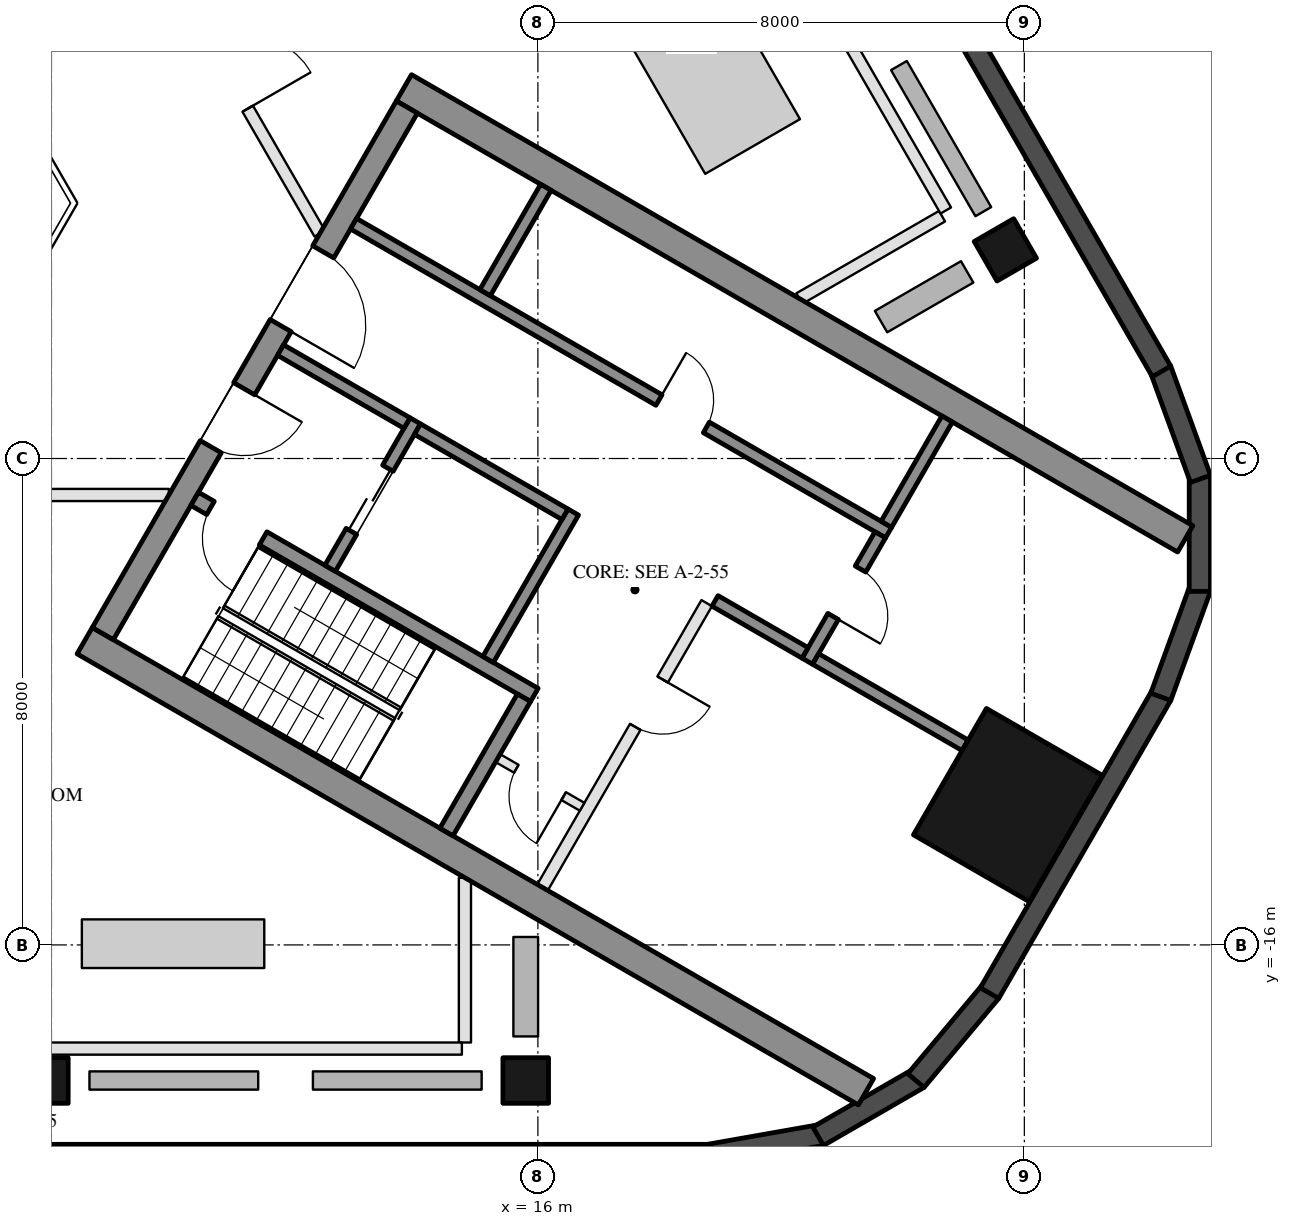
"""IFC4 building model, lengths in metres.
Left out: names, types, materials, properties, quantities, classifications, styles, units other than length and angle.
Written with IfcOpenShell. Run it as: python <this file> out.ifc"""

import sys

from ifc_helpers import new_model, si_unit, direction, frame, frame_2d, origin, origin_2d, place, context, subcontext, project, spatial, rectangle, hollow_rectangle, extrude, element, fill, save


model = new_model("IFC4")
c1 = context("Model", 3, precision=1e-05, world=origin(), true_north=direction((0.0, 1.0)))
c2 = subcontext(c1, "Body", "Model", "MODEL_VIEW")
j1 = project(units=[si_unit("LENGTHUNIT", "METRE"), si_unit("PLANEANGLEUNIT", "RADIAN")], contexts=[c1])
p1 = place(None, origin())
s1 = spatial("IfcSite", under=j1, at=p1, CompositionType="ELEMENT")
p2 = place(p1, origin())
s2 = spatial("IfcBuilding", under=s1, at=p2, CompositionType="ELEMENT")
p3 = place(p2, frame((0.0, 0.0, 237.7)))
s3 = spatial("IfcBuildingStorey", under=s2, at=p3, CompositionType="ELEMENT", Elevation=237.7)
for number, where, z_axis, x_axis in (
    (1, (7.9, -18.23, 0.0), (0.0, 0.0, 1.0), (-1.0, 0.0, 0.0)),
    (2, (15.8, -18.23, 0.0), (0.0, 0.0, 1.0), (-1.0, 0.0, 0.0)),
    (3, (23.688, -4.568, 0.0), (0.0, 0.0, 1.0), (-0.5, 0.866, 0.0)),
):
    element("IfcColumn", number, at=place(p3, frame(where, z_axis=z_axis, x_axis=x_axis)), inside=s3, PredefinedType="COLUMN", context=c2, shape_type="SweptSolid", body=[
        extrude(hollow_rectangle(XDim=0.75, YDim=0.75, WallThickness=0.035, at=origin_2d()), origin(), (0.0, 0.0, 1.0), 4.5),
    ])
p4 = place(p3, frame((23.729, -13.7, 0.0), z_axis=(0.0, 0.0, 1.0), x_axis=(0.5, 0.866025403784, 0.0)))
e4 = element("IfcColumn", 4, at=p4, inside=s3, PredefinedType="COLUMN", context=c2, shape_type="SweptSolid", body=[
    extrude(hollow_rectangle(XDim=2.4, YDim=2.2, WallThickness=0.06, at=origin_2d()), origin(), (0.0, 0.0, 1.0), 4.5),
])
p5 = place(p3, frame((-18.816, -19.455, 0.0), z_axis=(0.0, 0.0, 1.0), x_axis=(1.0, 0.0, 0.0)))
e5 = element("IfcWall", 5, at=p5, inside=s3, PredefinedType="SOLIDWALL", context=c2, shape_type="SweptSolid", body=[
    extrude(rectangle(XDim=37.632, YDim=0.35, at=frame_2d((18.816, 0.0))), origin(), (0.0, 0.0, 1.0), 4.2),
])
p6 = place(p3, frame((18.785, -19.458, 0.0), z_axis=(0.0, 0.0, 1.0), x_axis=(0.984798995425, 0.173697837091, 0.0)))
e6 = element("IfcWall", 6, at=p6, inside=s3, PredefinedType="SOLIDWALL", context=c2, shape_type="SweptSolid", body=[
    extrude(rectangle(XDim=1.91, YDim=0.35, at=frame_2d((0.955, 0.0))), origin(), (0.0, 0.0, 1.0), 4.2),
])
for number, where, z_axis, x_axis in (
    (7, (20.61, -19.147, 0.0), (0.0, 0.0, 1.0), (0.866, 0.5, 0.0)),
    (8, (22.217, -18.231, 0.0), (0.0, 0.0, 1.0), (0.643, 0.766, 0.0)),
):
    element("IfcWall", number, at=place(p3, frame(where, z_axis=z_axis, x_axis=x_axis)), inside=s3, PredefinedType="SOLIDWALL", context=c2, shape_type="SweptSolid", body=[
        extrude(rectangle(XDim=1.91, YDim=0.35, at=frame_2d((0.955, 0.0))), origin(), (0.0, 0.0, 1.0), 4.2),
    ])
p7 = place(p3, frame((23.427, -16.792, 0.0), z_axis=(0.0, 0.0, 1.0), x_axis=(0.499986410639, 0.866033249463, 0.0)))
e9 = element("IfcWall", 9, at=p7, inside=s3, PredefinedType="SOLIDWALL", context=c2, shape_type="SweptSolid", body=[
    extrude(rectangle(XDim=5.658, YDim=0.35, at=frame_2d((2.829, 0.0))), origin(), (0.0, 0.0, 1.0), 4.2),
])
for number, where, z_axis, x_axis in (
    (10, (26.244, -11.92, 0.0), (0.0, 0.0, 1.0), (0.342, 0.94, 0.0)),
    (11, (26.886, -10.185, 0.0), (0.0, 0.0, 1.0), (0.0, 1.0, 0.0)),
    (12, (26.897, -8.335, 0.0), (0.0, 0.0, 1.0), (-0.342, 0.94, 0.0)),
):
    element("IfcWall", number, at=place(p3, frame(where, z_axis=z_axis, x_axis=x_axis)), inside=s3, PredefinedType="SOLIDWALL", context=c2, shape_type="SweptSolid", body=[
        extrude(rectangle(XDim=1.91, YDim=0.35, at=frame_2d((0.955, 0.0))), origin(), (0.0, 0.0, 1.0), 4.2),
    ])
p8 = place(p3, frame((26.256, -6.567, 0.0), z_axis=(0.0, 0.0, 1.0), x_axis=(-0.499998380999, 0.866026338513, 0.0)))
e13 = element("IfcWall", 13, at=p8, inside=s3, PredefinedType="SOLIDWALL", context=c2, shape_type="SweptSolid", body=[
    extrude(rectangle(XDim=37.631, YDim=0.35, at=frame_2d((18.816, 0.0))), origin(), (0.0, 0.0, 1.0), 4.2),
])
for number, where, z_axis, x_axis in (
    (14, (8.547, -10.997, 0.0), (0.0, 0.0, 1.0), (0.866, -0.5, 0.0)),
    (15, (13.797, -1.903, 0.0), (0.0, 0.0, 1.0), (0.866, -0.5, 0.0)),
):
    element("IfcWall", number, at=place(p3, frame(where, z_axis=z_axis, x_axis=x_axis)), inside=s3, PredefinedType="SHEAR", context=c2, shape_type="SweptSolid", body=[
        extrude(rectangle(XDim=14.837, YDim=0.5, at=frame_2d((7.418, 0.0))), origin(), (0.0, 0.0, 1.0), 4.2),
    ])
p9 = place(p3, frame((8.845, -10.88, 0.0), z_axis=(0.0, 0.0, 1.0), x_axis=(0.500004234368, 0.866022959057, 0.0)))
e16 = element("IfcWall", 16, at=p9, inside=s3, PredefinedType="SHEAR", context=c2, shape_type="SweptSolid", body=[
    extrude(rectangle(XDim=10.0, YDim=0.4, at=frame_2d((5.0, 0.0))), origin(), (0.0, 0.0, 1.0), 4.2),
])
p10 = place(p9, frame((3.55, 0.0, 0.0)))
e17 = element("IfcOpeningElement", 17, at=p10, cuts=e16, PredefinedType="OPENING", context=c2, shape_type="SweptSolid", body=[
    extrude(rectangle(XDim=1.1, YDim=2.1, at=frame_2d((0.55, 1.05))), frame((0.0, 0.21, 0.0), z_axis=(0.0, -1.0, 0.0), x_axis=(1.0, 0.0, 0.0)), (0.0, 0.0, 1.0), 0.42),
])
p11 = place(p9, frame((5.85, 0.0, 0.0)))
e18 = element("IfcOpeningElement", 18, at=p11, cuts=e16, PredefinedType="OPENING", context=c2, shape_type="SweptSolid", body=[
    extrude(rectangle(XDim=1.4, YDim=2.1, at=frame_2d((0.7, 1.05))), frame((0.0, 0.21, 0.0), z_axis=(0.0, -1.0, 0.0), x_axis=(1.0, 0.0, 0.0)), (0.0, 0.0, 1.0), 0.42),
])
p12 = place(p3, frame((10.356, -8.664, 0.0), z_axis=(0.0, 0.0, 1.0), x_axis=(0.866028629588, -0.499994412703, 0.0)))
e19 = element("IfcWall", 19, at=p12, inside=s3, PredefinedType="SHEAR", context=c2, shape_type="SweptSolid", body=[
    extrude(rectangle(XDim=6.45, YDim=0.25, at=frame_2d((3.225, 0.0))), origin(), (0.0, 0.0, 1.0), 4.2),
])
p13 = place(p12, frame((0.3, 0.0, 0.0)))
e20 = element("IfcOpeningElement", 20, at=p13, cuts=e19, PredefinedType="OPENING", context=c2, shape_type="SweptSolid", body=[
    extrude(rectangle(XDim=1.0, YDim=2.1, at=frame_2d((0.5, 1.05))), frame((0.0, 0.135, 0.0), z_axis=(0.0, -1.0, 0.0), x_axis=(1.0, 0.0, 0.0)), (0.0, 0.0, 1.0), 0.27),
])
p14 = place(p3, frame((14.496, -14.143, 0.0), z_axis=(0.0, 0.0, 1.0), x_axis=(0.500062241894, 0.865989465428, 0.0)))
e21 = element("IfcWall", 21, at=p14, inside=s3, PredefinedType="SHEAR", context=c2, shape_type="SweptSolid", body=[
    extrude(rectangle(XDim=2.55, YDim=0.25, at=frame_2d((1.275, 0.0))), origin(), (0.0, 0.0, 1.0), 4.2),
])
p15 = place(p3, frame((15.181, -11.305, 0.0), z_axis=(0.0, 0.0, 1.0), x_axis=(0.49994636267, 0.866056369097, 0.0)))
e22 = element("IfcWall", 22, at=p15, inside=s3, PredefinedType="SHEAR", context=c2, shape_type="SweptSolid", body=[
    extrude(rectangle(XDim=2.8, YDim=0.2, at=frame_2d((1.4, 0.0))), origin(), (0.0, 0.0, 1.0), 4.2),
])
p16 = place(p3, frame((12.583, -9.805, 0.0), z_axis=(0.0, 0.0, 1.0), x_axis=(0.49994636267, 0.866056369097, 0.0)))
e23 = element("IfcWall", 23, at=p16, inside=s3, PredefinedType="SHEAR", context=c2, shape_type="SweptSolid", body=[
    extrude(rectangle(XDim=2.8, YDim=0.2, at=frame_2d((1.4, 0.0))), origin(), (0.0, 0.0, 1.0), 4.2),
])
p17 = place(p16, frame((0.7, 0.0, 0.0)))
e24 = element("IfcOpeningElement", 24, at=p17, cuts=e23, PredefinedType="OPENING", context=c2, shape_type="SweptSolid", body=[
    extrude(rectangle(XDim=1.2, YDim=2.1, at=frame_2d((0.6, 1.05))), frame((0.0, 0.11, 0.0), z_axis=(0.0, -1.0, 0.0), x_axis=(1.0, 0.0, 0.0)), (0.0, 0.0, 1.0), 0.22),
])
p18 = place(p3, frame((11.768, -6.217, 0.0), z_axis=(0.0, 0.0, 1.0), x_axis=(0.866050077142, -0.499957262057, 0.0)))
e25 = element("IfcWall", 25, at=p18, inside=s3, PredefinedType="SHEAR", context=c2, shape_type="SweptSolid", body=[
    extrude(rectangle(XDim=2.4, YDim=0.2, at=frame_2d((1.2, 0.0))), origin(), (0.0, 0.0, 1.0), 4.2),
])
p19 = place(p3, frame((14.02, -7.517, 0.0), z_axis=(0.0, 0.0, 1.0), x_axis=(0.866034573852, -0.49998411664, 0.0)))
e26 = element("IfcWall", 26, at=p19, inside=s3, PredefinedType="SHEAR", context=c2, shape_type="SweptSolid", body=[
    extrude(rectangle(XDim=2.8, YDim=0.2, at=frame_2d((1.4, 0.0))), origin(), (0.0, 0.0, 1.0), 4.2),
])
p20 = place(p3, frame((12.968, -4.138, 0.0), z_axis=(0.0, 0.0, 1.0), x_axis=(0.866028328073, -0.49999493495, 0.0)))
e27 = element("IfcWall", 27, at=p20, inside=s3, PredefinedType="SHEAR", context=c2, shape_type="SweptSolid", body=[
    extrude(rectangle(XDim=10.16, YDim=0.2, at=frame_2d((5.08, 0.0))), origin(), (0.0, 0.0, 1.0), 4.2),
])
p21 = place(p20, frame((5.8, 0.0, 0.0)))
e28 = element("IfcOpeningElement", 28, at=p21, cuts=e27, PredefinedType="OPENING", context=c2, shape_type="SweptSolid", body=[
    extrude(rectangle(XDim=0.9, YDim=2.1, at=frame_2d((0.45, 1.05))), frame((0.0, 0.11, 0.0), z_axis=(0.0, -1.0, 0.0), x_axis=(1.0, 0.0, 0.0)), (0.0, 0.0, 1.0), 0.22),
])
p22 = place(p3, frame((20.43, -11.333, 0.0), z_axis=(0.0, 0.0, 1.0), x_axis=(0.500001309137, 0.866024647952, 0.0)))
e29 = element("IfcWall", 29, at=p22, inside=s3, PredefinedType="SHEAR", context=c2, shape_type="SweptSolid", body=[
    extrude(rectangle(XDim=2.4, YDim=0.2, at=frame_2d((1.2, 0.0))), origin(), (0.0, 0.0, 1.0), 4.2),
])
p23 = place(p22, frame((0.85, 0.0, 0.0)))
e30 = element("IfcOpeningElement", 30, at=p23, cuts=e29, PredefinedType="OPENING", context=c2, shape_type="SweptSolid", body=[
    extrude(rectangle(XDim=0.9, YDim=2.1, at=frame_2d((0.45, 1.05))), frame((0.0, 0.11, 0.0), z_axis=(0.0, -1.0, 0.0), x_axis=(1.0, 0.0, 0.0)), (0.0, 0.0, 1.0), 0.22),
])
p24 = place(p3, frame((18.913, -10.342, 0.0), z_axis=(0.0, 0.0, 1.0), x_axis=(0.866038183914, -0.499977863513, 0.0)))
e31 = element("IfcWall", 31, at=p24, inside=s3, PredefinedType="SHEAR", context=c2, shape_type="SweptSolid", body=[
    extrude(rectangle(XDim=1.71, YDim=0.2, at=frame_2d((0.855, 0.0))), origin(), (0.0, 0.0, 1.0), 4.2),
])
for number, where, z_axis, x_axis in (
    (32, (15.131, -5.272, 0.0), (0.0, 0.0, 1.0), (0.5, 0.866, 0.0)),
    (33, (21.73, -9.082, 0.0), (0.0, 0.0, 1.0), (0.5, 0.866, 0.0)),
):
    element("IfcWall", number, at=place(p3, frame(where, z_axis=z_axis, x_axis=x_axis)), inside=s3, PredefinedType="SHEAR", context=c2, shape_type="SweptSolid", body=[
        extrude(rectangle(XDim=2.0, YDim=0.2, at=frame_2d((1.0, 0.0))), origin(), (0.0, 0.0, 1.0), 4.2),
    ])
p25 = place(p3, frame((20.567, -11.297, 0.0), z_axis=(0.0, 0.0, 1.0), x_axis=(0.866055327414, -0.49994816717, 0.0)))
e34 = element("IfcWall", 34, at=p25, inside=s3, PredefinedType="SHEAR", context=c2, shape_type="SweptSolid", body=[
    extrude(rectangle(XDim=2.84, YDim=0.2, at=frame_2d((1.42, 0.0))), origin(), (0.0, 0.0, 1.0), 4.2),
])
p26 = place(p3, frame((16.076, -15.055, 0.0), z_axis=(0.0, 0.0, 1.0), x_axis=(0.499995103361, 0.866028230842, 0.0)))
e35 = element("IfcWall", 35, at=p26, inside=s3, PredefinedType="PARTITIONING", context=c2, shape_type="SweptSolid", body=[
    extrude(rectangle(XDim=5.4, YDim=0.2, at=frame_2d((2.7, 0.0))), origin(), (0.0, 0.0, 1.0), 4.2),
])
p27 = place(p26, frame((3.05, 0.0, 0.0)))
e36 = element("IfcOpeningElement", 36, at=p27, cuts=e35, PredefinedType="OPENING", context=c2, shape_type="SweptSolid", body=[
    extrude(rectangle(XDim=0.9, YDim=2.1, at=frame_2d((0.45, 1.05))), frame((0.0, 0.11, 0.0), z_axis=(0.0, -1.0, 0.0), x_axis=(1.0, 0.0, 0.0)), (0.0, 0.0, 1.0), 0.22),
])
p28 = place(p3, frame((15.342, -12.928, 0.0), z_axis=(0.0, 0.0, 1.0), x_axis=(0.865989903783, -0.500061482766, 0.0)))
e37 = element("IfcWall", 37, at=p28, inside=s3, PredefinedType="PARTITIONING", context=c2, shape_type="SweptSolid", body=[
    extrude(rectangle(XDim=1.6, YDim=0.15, at=frame_2d((0.8, 0.0))), origin(), (0.0, 0.0, 1.0), 4.2),
])
p29 = place(p28, frame((0.35, 0.0, 0.0)))
e38 = element("IfcOpeningElement", 38, at=p29, cuts=e37, PredefinedType="OPENING", context=c2, shape_type="SweptSolid", body=[
    extrude(rectangle(XDim=0.9, YDim=2.1, at=frame_2d((0.45, 1.05))), frame((0.0, 0.085, 0.0), z_axis=(0.0, -1.0, 0.0), x_axis=(1.0, 0.0, 0.0)), (0.0, 0.0, 1.0), 0.17),
])
p30 = place(p3, frame((14.8, -17.605, 0.0), z_axis=(0.0, 0.0, 1.0), x_axis=(0.0, 1.0, 0.0)))
e39 = element("IfcWall", 39, at=p30, inside=s3, PredefinedType="PARTITIONING", context=c2, shape_type="SweptSolid", body=[
    extrude(rectangle(XDim=2.709, YDim=0.2, at=frame_2d((1.355, 0.0))), origin(), (0.0, 0.0, 1.0), 4.2),
])
p31 = place(p3, frame((-14.75, -17.705, 0.0), z_axis=(0.0, 0.0, 1.0), x_axis=(1.0, 0.0, 0.0)))
e40 = element("IfcWall", 40, at=p31, inside=s3, PredefinedType="PARTITIONING", context=c2, shape_type="SweptSolid", body=[
    extrude(rectangle(XDim=29.5, YDim=0.2, at=frame_2d((14.75, 0.0))), origin(), (0.0, 0.0, 1.0), 3.41),
])
p32 = place(p3, frame((-9.93, -8.6, 0.0), z_axis=(0.0, 0.0, 1.0), x_axis=(1.0, 0.0, 0.0)))
e41 = element("IfcWall", 41, at=p32, inside=s3, PredefinedType="PARTITIONING", context=c2, shape_type="SweptSolid", body=[
    extrude(rectangle(XDim=19.861, YDim=0.2, at=frame_2d((9.93, 0.0))), origin(), (0.0, 0.0, 1.0), 3.41),
])
p33 = place(p32, frame((6.121, 0.0, 0.0)))
e42 = element("IfcOpeningElement", 42, at=p33, cuts=e41, PredefinedType="OPENING", context=c2, shape_type="SweptSolid", body=[
    extrude(rectangle(XDim=1.2, YDim=2.1, at=frame_2d((0.6, 1.05))), frame((0.0, 0.11, 0.0), z_axis=(0.0, -1.0, 0.0), x_axis=(1.0, 0.0, 0.0)), (0.0, 0.0, 1.0), 0.22),
])
p34 = place(p32, frame((16.04, 0.0, 0.0)))
e43 = element("IfcOpeningElement", 43, at=p34, cuts=e41, PredefinedType="OPENING", context=c2, shape_type="SweptSolid", body=[
    extrude(rectangle(XDim=1.2, YDim=2.1, at=frame_2d((0.6, 1.05))), frame((0.0, 0.11, 0.0), z_axis=(0.0, -1.0, 0.0), x_axis=(1.0, 0.0, 0.0)), (0.0, 0.0, 1.0), 0.22),
])
p35 = place(p3, frame((22.646, -4.015, 0.0), z_axis=(0.0, 0.0, 1.0), x_axis=(-0.866044551023, -0.499966834543, 0.0)))
e44 = element("IfcWall", 44, at=p35, inside=s3, PredefinedType="PARTITIONING", context=c2, shape_type="SweptSolid", body=[
    extrude(rectangle(XDim=2.71, YDim=0.2, at=frame_2d((1.355, 0.0))), origin(), (0.0, 0.0, 1.0), 4.2),
])
p36 = place(p3, frame((22.708, -3.921, 0.0), z_axis=(0.0, 0.0, 1.0), x_axis=(-0.499998500593, 0.866026269466, 0.0)))
e45 = element("IfcWall", 45, at=p36, inside=s3, PredefinedType="PARTITIONING", context=c2, shape_type="SweptSolid", body=[
    extrude(rectangle(XDim=29.5, YDim=0.2, at=frame_2d((14.75, 0.0))), origin(), (0.0, 0.0, 1.0), 3.41),
])
p37 = place(p3, frame((12.413, -4.3, 0.0), z_axis=(0.0, 0.0, 1.0), x_axis=(-0.50000478328, 0.866022642139, 0.0)))
e46 = element("IfcWall", 46, at=p37, inside=s3, PredefinedType="PARTITIONING", context=c2, shape_type="SweptSolid", body=[
    extrude(rectangle(XDim=19.861, YDim=0.2, at=frame_2d((9.931, 0.0))), origin(), (0.0, 0.0, 1.0), 3.41),
])
p38 = place(p37, frame((2.371, 0.0, 0.0)))
e47 = element("IfcOpeningElement", 47, at=p38, cuts=e46, PredefinedType="OPENING", context=c2, shape_type="SweptSolid", body=[
    extrude(rectangle(XDim=1.2, YDim=2.1, at=frame_2d((0.6, 1.05))), frame((0.0, 0.11, 0.0), z_axis=(0.0, -1.0, 0.0), x_axis=(1.0, 0.0, 0.0)), (0.0, 0.0, 1.0), 0.22),
])
p39 = place(p37, frame((8.581, 0.0, 0.0)))
e48 = element("IfcOpeningElement", 48, at=p39, cuts=e46, PredefinedType="OPENING", context=c2, shape_type="SweptSolid", body=[
    extrude(rectangle(XDim=1.2, YDim=2.1, at=frame_2d((0.6, 1.05))), frame((0.0, 0.11, 0.0), z_axis=(0.0, -1.0, 0.0), x_axis=(1.0, 0.0, 0.0)), (0.0, 0.0, 1.0), 0.22),
])
p40 = place(p37, frame((15.54, 0.0, 0.0)))
e49 = element("IfcOpeningElement", 49, at=p40, cuts=e46, PredefinedType="OPENING", context=c2, shape_type="SweptSolid", body=[
    extrude(rectangle(XDim=1.2, YDim=2.1, at=frame_2d((0.6, 1.05))), frame((0.0, 0.11, 0.0), z_axis=(0.0, -1.0, 0.0), x_axis=(1.0, 0.0, 0.0)), (0.0, 0.0, 1.0), 0.22),
])
p41 = place(p17, origin())
e50 = element("IfcDoor", 50, at=p41, inside=s3, OperationType="DOUBLE_DOOR_SLIDING", PredefinedType="DOOR", context=c2, shape_type="SweptSolid", body=[
    extrude(rectangle(XDim=1.2, YDim=2.1, at=frame_2d((0.6, 1.05))), frame((0.0, 0.025, 0.0), z_axis=(0.0, -1.0, 0.0), x_axis=(1.0, 0.0, 0.0)), (0.0, 0.0, 1.0), 0.05),
])
fill(e24, e50)
p42 = place(p29, frame((0.9, 0.0, 0.0), z_axis=(0.0, 0.0, 1.0), x_axis=(-1.0, 0.0, 0.0)))
e51 = element("IfcDoor", 51, at=p42, inside=s3, OperationType="SINGLE_SWING_LEFT", PredefinedType="DOOR", context=c2, shape_type="SweptSolid", body=[
    extrude(rectangle(XDim=0.9, YDim=2.1, at=frame_2d((0.45, 1.05))), frame((0.0, 0.025, 0.0), z_axis=(0.0, -1.0, 0.0), x_axis=(1.0, 0.0, 0.0)), (0.0, 0.0, 1.0), 0.05),
])
fill(e38, e51)
p43 = place(p21, origin())
e52 = element("IfcDoor", 52, at=p43, inside=s3, OperationType="SINGLE_SWING_LEFT", PredefinedType="DOOR", context=c2, shape_type="SweptSolid", body=[
    extrude(rectangle(XDim=0.9, YDim=2.1, at=frame_2d((0.45, 1.05))), frame((0.0, 0.025, 0.0), z_axis=(0.0, -1.0, 0.0), x_axis=(1.0, 0.0, 0.0)), (0.0, 0.0, 1.0), 0.05),
])
fill(e28, e52)
p44 = place(p23, frame((0.9, 0.0, 0.0), z_axis=(0.0, 0.0, 1.0), x_axis=(-1.0, 0.0, 0.0)))
e53 = element("IfcDoor", 53, at=p44, inside=s3, OperationType="SINGLE_SWING_RIGHT", PredefinedType="DOOR", context=c2, shape_type="SweptSolid", body=[
    extrude(rectangle(XDim=0.9, YDim=2.1, at=frame_2d((0.45, 1.05))), frame((0.0, 0.025, 0.0), z_axis=(0.0, -1.0, 0.0), x_axis=(1.0, 0.0, 0.0)), (0.0, 0.0, 1.0), 0.05),
])
fill(e30, e53)
p45 = place(p27, frame((0.9, 0.0, 0.0), z_axis=(0.0, 0.0, 1.0), x_axis=(-1.0, 0.0, 0.0)))
e54 = element("IfcDoor", 54, at=p45, inside=s3, OperationType="SINGLE_SWING_LEFT", PredefinedType="DOOR", context=c2, shape_type="SweptSolid", body=[
    extrude(rectangle(XDim=0.9, YDim=2.1, at=frame_2d((0.45, 1.05))), frame((0.0, 0.025, 0.0), z_axis=(0.0, -1.0, 0.0), x_axis=(1.0, 0.0, 0.0)), (0.0, 0.0, 1.0), 0.05),
])
fill(e36, e54)
p46 = place(p10, frame((1.1, 0.0, 0.0), z_axis=(0.0, 0.0, 1.0), x_axis=(-1.0, 0.0, 0.0)))
e55 = element("IfcDoor", 55, at=p46, inside=s3, OperationType="SINGLE_SWING_LEFT", PredefinedType="DOOR", context=c2, shape_type="SweptSolid", body=[
    extrude(rectangle(XDim=1.1, YDim=2.1, at=frame_2d((0.55, 1.05))), frame((0.0, 0.025, 0.0), z_axis=(0.0, -1.0, 0.0), x_axis=(1.0, 0.0, 0.0)), (0.0, 0.0, 1.0), 0.05),
])
fill(e17, e55)
p47 = place(p11, frame((1.4, 0.0, 0.0), z_axis=(0.0, 0.0, 1.0), x_axis=(-1.0, 0.0, 0.0)))
e56 = element("IfcDoor", 56, at=p47, inside=s3, OperationType="DOUBLE_DOOR_SINGLE_SWING", PredefinedType="DOOR", context=c2, shape_type="SweptSolid", body=[
    extrude(rectangle(XDim=1.4, YDim=2.1, at=frame_2d((0.7, 1.05))), frame((0.0, 0.025, 0.0), z_axis=(0.0, -1.0, 0.0), x_axis=(1.0, 0.0, 0.0)), (0.0, 0.0, 1.0), 0.05),
])
fill(e18, e56)
p48 = place(p13, frame((1.0, 0.0, 0.0), z_axis=(0.0, 0.0, 1.0), x_axis=(-1.0, 0.0, 0.0)))
e57 = element("IfcDoor", 57, at=p48, inside=s3, OperationType="SINGLE_SWING_LEFT", PredefinedType="DOOR", context=c2, shape_type="SweptSolid", body=[
    extrude(rectangle(XDim=1.0, YDim=2.1, at=frame_2d((0.5, 1.05))), frame((0.0, 0.025, 0.0), z_axis=(0.0, -1.0, 0.0), x_axis=(1.0, 0.0, 0.0)), (0.0, 0.0, 1.0), 0.05),
])
fill(e20, e57)
p49 = place(p38, frame((1.2, 0.0, 0.0), z_axis=(0.0, 0.0, 1.0), x_axis=(-1.0, 0.0, 0.0)))
e58 = element("IfcDoor", 58, at=p49, inside=s3, OperationType="SINGLE_SWING_RIGHT", PredefinedType="DOOR", context=c2, shape_type="SweptSolid", body=[
    extrude(rectangle(XDim=1.2, YDim=2.1, at=frame_2d((0.6, 1.05))), frame((0.0, 0.025, 0.0), z_axis=(0.0, -1.0, 0.0), x_axis=(1.0, 0.0, 0.0)), (0.0, 0.0, 1.0), 0.05),
])
fill(e47, e58)
save(model, sys.argv[1])
